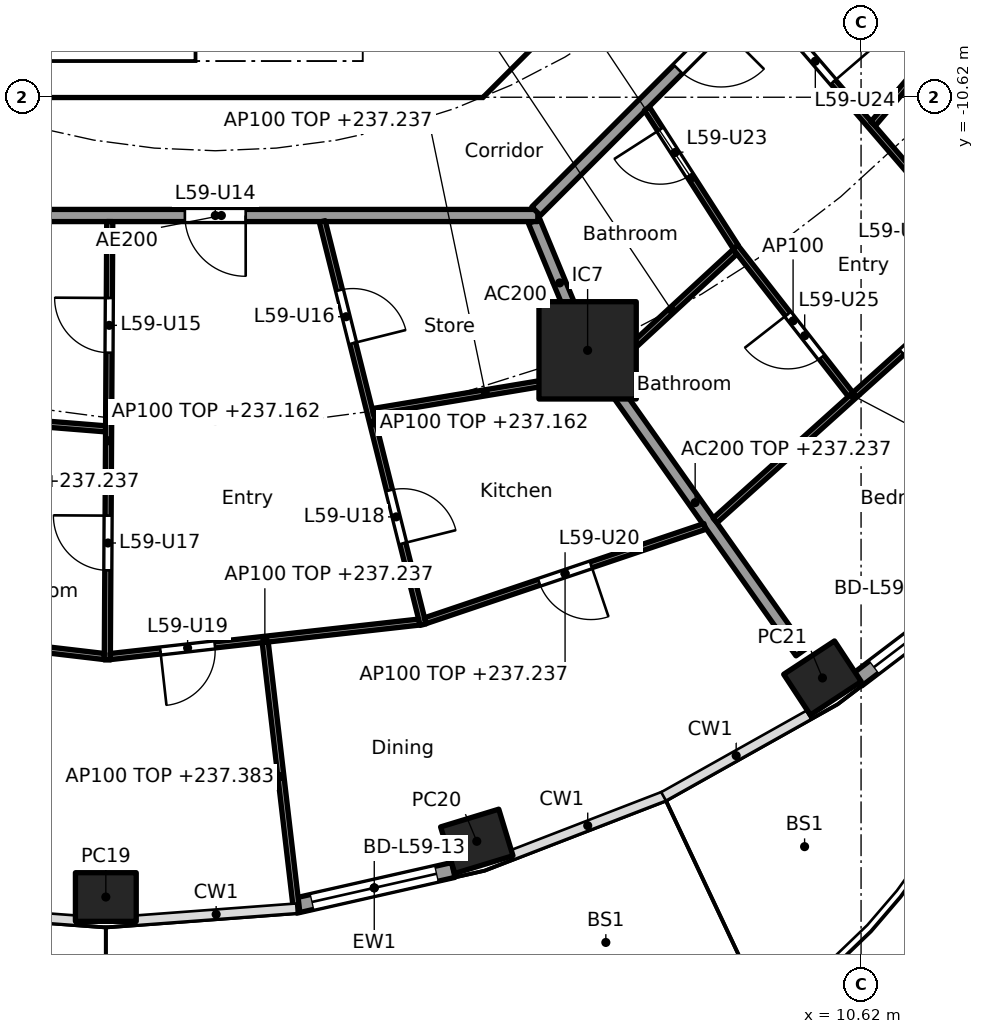
"""IFC4 building model, lengths in metres.
Left out: names, types, materials, properties, quantities, classifications, styles, units other than length and angle.
Written with IfcOpenShell. Run it as: python <this file> out.ifc"""

import sys

from ifc_helpers import new_model, si_unit, direction, frame, frame_2d, origin, origin_2d, place, context, subcontext, project, spatial, polyline, rectangle, hollow_rectangle, outline, extrude, element, fill, save


model = new_model("IFC4")
c1 = context("Model", 3, precision=1e-05, world=origin(), true_north=direction((0.0, 1.0)))
c2 = subcontext(c1, "Body", "Model", "MODEL_VIEW")
j1 = project(units=[si_unit("LENGTHUNIT", "METRE"), si_unit("PLANEANGLEUNIT", "RADIAN")], contexts=[c1])
p1 = place(None, origin())
s1 = spatial("IfcSite", under=j1, at=p1, CompositionType="ELEMENT")
p2 = place(p1, origin())
s2 = spatial("IfcBuilding", under=s1, at=p2, CompositionType="ELEMENT")
p3 = place(p2, frame((0.0, 0.0, 234.4)))
s3 = spatial("IfcBuildingStorey", under=s2, at=p3, CompositionType="ELEMENT", Elevation=234.4)
for number, where, z_axis, x_axis in (
    (1, (-1.8, -23.772, 0.0), (0.0, 0.0, 1.0), (1.0, 0.0, 0.0)),
    (2, (4.3, -22.856, 0.0), (0.0, 0.0, 1.0), (0.957, 0.292, 0.0)),
    (3, (9.985, -20.17, 0.0), (0.0, 0.0, 1.0), (0.836, 0.549, 0.0)),
):
    element("IfcColumn", number, at=place(p3, frame(where, z_axis=z_axis, x_axis=x_axis)), inside=s3, PredefinedType="COLUMN", context=c2, shape_type="SweptSolid", body=[
        extrude(hollow_rectangle(XDim=1.0, YDim=0.8, WallThickness=0.032, at=origin_2d()), origin(), (0.0, 0.0, 1.0), 3.7),
    ])
p4 = place(p3, frame((6.123, -14.782, 0.0), z_axis=(0.0, 0.0, 1.0), x_axis=(1.0, 0.0, 0.0)))
e4 = element("IfcColumn", 4, at=p4, inside=s3, PredefinedType="COLUMN", context=c2, shape_type="SweptSolid", body=[
    extrude(rectangle(XDim=1.6, YDim=1.6, at=origin_2d()), origin(), (0.0, 0.0, 1.0), 3.7),
])
p5 = place(p3, frame((3.915, -23.327, 0.0), z_axis=(0.0, 0.0, 1.0), x_axis=(-0.975324089124, -0.220777990694, 0.0)))
e5 = element("IfcWall", 5, at=p5, inside=s3, PredefinedType="SOLIDWALL", context=c2, shape_type="SweptSolid", body=[
    extrude(rectangle(XDim=2.666, YDim=0.25, at=frame_2d((1.333, 0.0))), origin(), (0.0, 0.0, 1.0), 3.44),
])
p6 = place(p5, frame((0.283, 0.0, 0.0)))
e6 = element("IfcOpeningElement", 6, at=p6, cuts=e5, PredefinedType="OPENING", context=c2, shape_type="SweptSolid", body=[
    extrude(rectangle(XDim=2.1, YDim=2.4, at=frame_2d((1.05, 1.2))), frame((0.0, 0.135, 0.0), z_axis=(0.0, -1.0, 0.0), x_axis=(1.0, 0.0, 0.0)), (0.0, 0.0, 1.0), 0.27),
])
p7 = place(p3, frame((12.777, -18.513, 0.0), z_axis=(0.0, 0.0, 1.0), x_axis=(-0.796022158395, -0.605267480825, 0.0)))
e7 = element("IfcWall", 7, at=p7, inside=s3, PredefinedType="SOLIDWALL", context=c2, shape_type="SweptSolid", body=[
    extrude(rectangle(XDim=2.789, YDim=0.25, at=frame_2d((1.395, 0.0))), origin(), (0.0, 0.0, 1.0), 3.44),
])
p8 = place(p7, frame((0.344, 0.0, 0.0)))
e8 = element("IfcOpeningElement", 8, at=p8, cuts=e7, PredefinedType="OPENING", context=c2, shape_type="SweptSolid", body=[
    extrude(rectangle(XDim=2.1, YDim=2.4, at=frame_2d((1.05, 1.2))), frame((0.0, 0.135, 0.0), z_axis=(0.0, -1.0, 0.0), x_axis=(1.0, 0.0, 0.0)), (0.0, 0.0, 1.0), 0.27),
])
p9 = place(p3, frame((4.613, -9.988, 0.0), z_axis=(0.0, 0.0, 1.0), x_axis=(0.707106781187, 0.707106781187, 0.0)))
e9 = element("IfcWall", 9, at=p9, inside=s3, PredefinedType="SHEAR", context=c2, shape_type="SweptSolid", body=[
    extrude(rectangle(XDim=7.602, YDim=0.6, at=frame_2d((3.801, 0.0))), origin(), (0.0, 0.0, 1.0), 3.44),
])
p10 = place(p9, frame((3.201, 0.0, 0.0)))
e10 = element("IfcOpeningElement", 10, at=p10, cuts=e9, PredefinedType="OPENING", context=c2, shape_type="SweptSolid", body=[
    extrude(rectangle(XDim=1.2, YDim=2.1, at=frame_2d((0.6, 1.05))), frame((0.0, 0.31, 0.0), z_axis=(0.0, -1.0, 0.0), x_axis=(1.0, 0.0, 0.0)), (0.0, 0.0, 1.0), 0.62),
])
p11 = place(p3, frame((4.0, -10.025, 0.0), z_axis=(0.0, 0.0, 1.0), x_axis=(0.0, 1.0, 0.0)))
e11 = element("IfcWall", 11, at=p11, inside=s3, PredefinedType="SOLIDWALL", context=c2, shape_type="SweptSolid", body=[
    extrude(rectangle(XDim=3.0, YDim=0.2, at=frame_2d((1.5, 0.0))), origin(), (0.0, 0.0, 1.0), 3.44),
])
p12 = place(p11, frame((0.975, 0.0, 0.0)))
e12 = element("IfcOpeningElement", 12, at=p12, cuts=e11, PredefinedType="OPENING", context=c2, shape_type="SweptSolid", body=[
    extrude(rectangle(XDim=1.1, YDim=2.1, at=frame_2d((0.55, 1.05))), frame((0.0, 0.11, 0.0), z_axis=(0.0, -1.0, 0.0), x_axis=(1.0, 0.0, 0.0)), (0.0, 0.0, 1.0), 0.22),
])
p13 = place(p3, origin())
e13 = element("IfcWall", 13, at=p13, inside=s3, PredefinedType="SHEAR", context=c2, shape_type="SweptSolid", body=[
    extrude(outline(polyline([(-4.152, -10.025), (4.152, -10.025), (4.401, -9.776), (4.825, -10.2), (4.401, -10.625), (-4.401, -10.625), (-4.825, -10.2), (-4.401, -9.776), (-4.152, -10.025)])), origin(), (0.0, 0.0, 1.0), 3.44),
])
p14 = place(p3, frame((5.243, -12.657, 0.0), z_axis=(0.0, 0.0, 1.0), x_axis=(0.382691608661, -0.923876145736, 0.0)))
e14 = element("IfcWall", 14, at=p14, inside=s3, PredefinedType="PARTITIONING", context=c2, shape_type="SweptSolid", body=[
    extrude(rectangle(XDim=2.2, YDim=0.2, at=frame_2d((1.1, 0.0))), origin(), (0.0, 0.0, 1.0), 3.44),
])
p15 = place(p3, frame((6.152, -14.823, 0.0), z_axis=(0.0, 0.0, 1.0), x_axis=(0.576994695158, -0.816747893637, 0.0)))
e15 = element("IfcWall", 15, at=p15, inside=s3, PredefinedType="PARTITIONING", context=c2, shape_type="SweptSolid", body=[
    extrude(rectangle(XDim=6.03, YDim=0.2, at=frame_2d((3.015, 0.0))), origin(), (0.0, 0.0, 1.0), 2.837),
])
p16 = place(p3, frame((-5.104, -12.565, 0.0), z_axis=(0.0, 0.0, 1.0), x_axis=(1.0, 0.0, 0.0)))
e16 = element("IfcWall", 16, at=p16, inside=s3, PredefinedType="PARTITIONING", context=c2, shape_type="SweptSolid", body=[
    extrude(rectangle(XDim=10.409, YDim=0.2, at=frame_2d((5.205, 0.0))), origin(), (0.0, 0.0, 1.0), 3.44),
])
p17 = place(p16, frame((4.604, 0.0, 0.0)))
e17 = element("IfcOpeningElement", 17, at=p17, cuts=e16, PredefinedType="OPENING", context=c2, shape_type="SweptSolid", body=[
    extrude(rectangle(XDim=1.0, YDim=2.1, at=frame_2d((0.5, 1.05))), frame((0.0, 0.11, 0.0), z_axis=(0.0, -1.0, 0.0), x_axis=(1.0, 0.0, 0.0)), (0.0, 0.0, 1.0), 0.22),
])
p18 = place(p3, frame((5.275, -12.494, 0.0), z_axis=(0.0, 0.0, 1.0), x_axis=(0.707106781187, 0.707106781187, 0.0)))
e18 = element("IfcWall", 18, at=p18, inside=s3, PredefinedType="PARTITIONING", context=c2, shape_type="SweptSolid", body=[
    extrude(rectangle(XDim=10.409, YDim=0.2, at=frame_2d((5.205, 0.0))), origin(), (0.0, 0.0, 1.0), 3.44),
])
p19 = place(p18, frame((3.303, 0.0, 0.0)))
e19 = element("IfcOpeningElement", 19, at=p19, cuts=e18, PredefinedType="OPENING", context=c2, shape_type="SweptSolid", body=[
    extrude(rectangle(XDim=1.0, YDim=2.1, at=frame_2d((0.5, 1.05))), frame((0.0, 0.11, 0.0), z_axis=(0.0, -1.0, 0.0), x_axis=(1.0, 0.0, 0.0)), (0.0, 0.0, 1.0), 0.22),
])
p20 = place(p3, frame((-6.23, -15.717, 0.0), z_axis=(0.0, 0.0, 1.0), x_axis=(0.996785662802, -0.080114558181, 0.0)))
e20 = element("IfcWall", 20, at=p20, inside=s3, PredefinedType="PARTITIONING", context=c2, shape_type="SweptSolid", body=[
    extrude(rectangle(XDim=4.44, YDim=0.1, at=frame_2d((2.22, 0.0))), origin(), (0.0, 0.0, 1.0), 2.837),
])
p21 = place(p3, frame((-7.008, -19.209, 0.0), z_axis=(0.0, 0.0, 1.0), x_axis=(0.993174535364, -0.116637653885, 0.0)))
e21 = element("IfcWall", 21, at=p21, inside=s3, PredefinedType="PARTITIONING", context=c2, shape_type="SweptSolid", body=[
    extrude(rectangle(XDim=5.218, YDim=0.1, at=frame_2d((2.609, 0.0))), origin(), (0.0, 0.0, 1.0), 2.837),
])
p22 = place(p21, frame((0.842, 0.0, 0.0)))
e22 = element("IfcOpeningElement", 22, at=p22, cuts=e21, PredefinedType="OPENING", context=c2, shape_type="SweptSolid", body=[
    extrude(rectangle(XDim=0.9, YDim=2.1, at=frame_2d((0.45, 1.05))), frame((0.0, 0.06, 0.0), z_axis=(0.0, -1.0, 0.0), x_axis=(1.0, 0.0, 0.0)), (0.0, 0.0, 1.0), 0.12),
])
p23 = place(p3, frame((-1.735, -12.665, 0.0), z_axis=(0.0, 0.0, 1.0), x_axis=(-0.005554152823, -0.999984575574, 0.0)))
e23 = element("IfcWall", 23, at=p23, inside=s3, PredefinedType="PARTITIONING", context=c2, shape_type="SweptSolid", body=[
    extrude(rectangle(XDim=7.209, YDim=0.1, at=frame_2d((3.604, 0.0))), origin(), (0.0, 0.0, 1.0), 2.762),
])
p24 = place(p23, frame((1.256, 0.0, 0.0)))
e24 = element("IfcOpeningElement", 24, at=p24, cuts=e23, PredefinedType="OPENING", context=c2, shape_type="SweptSolid", body=[
    extrude(rectangle(XDim=0.9, YDim=2.1, at=frame_2d((0.45, 1.05))), frame((0.0, 0.06, 0.0), z_axis=(0.0, -1.0, 0.0), x_axis=(1.0, 0.0, 0.0)), (0.0, 0.0, 1.0), 0.12),
])
p25 = place(p23, frame((4.836, 0.0, 0.0)))
e25 = element("IfcOpeningElement", 25, at=p25, cuts=e23, PredefinedType="OPENING", context=c2, shape_type="SweptSolid", body=[
    extrude(rectangle(XDim=0.9, YDim=2.1, at=frame_2d((0.45, 1.05))), frame((0.0, 0.06, 0.0), z_axis=(0.0, -1.0, 0.0), x_axis=(1.0, 0.0, 0.0)), (0.0, 0.0, 1.0), 0.12),
])
p26 = place(p3, frame((-1.726, -19.818, 0.0), z_axis=(0.0, 0.0, 1.0), x_axis=(0.99381893047, 0.111013212902, 0.0)))
e26 = element("IfcWall", 26, at=p26, inside=s3, PredefinedType="PARTITIONING", context=c2, shape_type="SweptSolid", body=[
    extrude(rectangle(XDim=5.113, YDim=0.1, at=frame_2d((2.557, 0.0))), origin(), (0.0, 0.0, 1.0), 2.837),
])
p27 = place(p26, frame((0.828, 0.0, 0.0)))
e27 = element("IfcOpeningElement", 27, at=p27, cuts=e26, PredefinedType="OPENING", context=c2, shape_type="SweptSolid", body=[
    extrude(rectangle(XDim=0.9, YDim=2.1, at=frame_2d((0.45, 1.05))), frame((0.0, 0.06, 0.0), z_axis=(0.0, -1.0, 0.0), x_axis=(1.0, 0.0, 0.0)), (0.0, 0.0, 1.0), 0.12),
])
p28 = place(p3, frame((0.821, -19.584, 0.0), z_axis=(0.0, 0.0, 1.0), x_axis=(0.116120946841, -0.993235080786, 0.0)))
e28 = element("IfcWall", 28, at=p28, inside=s3, PredefinedType="PARTITIONING", context=c2, shape_type="SweptSolid", body=[
    extrude(rectangle(XDim=4.445, YDim=0.1, at=frame_2d((2.222, 0.0))), origin(), (0.0, 0.0, 1.0), 2.983),
])
p29 = place(p3, frame((1.759, -12.662, 0.0), z_axis=(0.0, 0.0, 1.0), x_axis=(0.242653275363, -0.970113079984, 0.0)))
e29 = element("IfcWall", 29, at=p29, inside=s3, PredefinedType="PARTITIONING", context=c2, shape_type="SweptSolid", body=[
    extrude(rectangle(XDim=6.836, YDim=0.1, at=frame_2d((3.418, 0.0))), origin(), (0.0, 0.0, 1.0), 2.762),
])
p30 = place(p29, frame((1.166, 0.0, 0.0)))
e30 = element("IfcOpeningElement", 30, at=p30, cuts=e29, PredefinedType="OPENING", context=c2, shape_type="SweptSolid", body=[
    extrude(rectangle(XDim=0.9, YDim=2.1, at=frame_2d((0.45, 1.05))), frame((0.0, 0.06, 0.0), z_axis=(0.0, -1.0, 0.0), x_axis=(1.0, 0.0, 0.0)), (0.0, 0.0, 1.0), 0.12),
])
p31 = place(p29, frame((4.559, 0.0, 0.0)))
e31 = element("IfcOpeningElement", 31, at=p31, cuts=e29, PredefinedType="OPENING", context=c2, shape_type="SweptSolid", body=[
    extrude(rectangle(XDim=0.9, YDim=2.1, at=frame_2d((0.45, 1.05))), frame((0.0, 0.06, 0.0), z_axis=(0.0, -1.0, 0.0), x_axis=(1.0, 0.0, 0.0)), (0.0, 0.0, 1.0), 0.12),
])
p32 = place(p3, frame((2.593, -15.789, 0.0), z_axis=(0.0, 0.0, 1.0), x_axis=(0.986385117656, 0.164451815639, 0.0)))
e32 = element("IfcWall", 32, at=p32, inside=s3, PredefinedType="PARTITIONING", context=c2, shape_type="SweptSolid", body=[
    extrude(rectangle(XDim=3.747, YDim=0.1, at=frame_2d((1.874, 0.0))), origin(), (0.0, 0.0, 1.0), 2.837),
])
p33 = place(p3, frame((3.453, -19.229, 0.0), z_axis=(0.0, 0.0, 1.0), x_axis=(0.947565610716, 0.31956128268, 0.0)))
e33 = element("IfcWall", 33, at=p33, inside=s3, PredefinedType="PARTITIONING", context=c2, shape_type="SweptSolid", body=[
    extrude(rectangle(XDim=4.853, YDim=0.1, at=frame_2d((2.426, 0.0))), origin(), (0.0, 0.0, 1.0), 2.837),
])
p34 = place(p33, frame((1.976, 0.0, 0.0)))
e34 = element("IfcOpeningElement", 34, at=p34, cuts=e33, PredefinedType="OPENING", context=c2, shape_type="SweptSolid", body=[
    extrude(rectangle(XDim=0.9, YDim=2.1, at=frame_2d((0.45, 1.05))), frame((0.0, 0.06, 0.0), z_axis=(0.0, -1.0, 0.0), x_axis=(1.0, 0.0, 0.0)), (0.0, 0.0, 1.0), 0.12),
])
p35 = place(p3, frame((6.461, -15.088, 0.0), z_axis=(0.0, 0.0, 1.0), x_axis=(0.734625662691, 0.678472649203, 0.0)))
e35 = element("IfcWall", 35, at=p35, inside=s3, PredefinedType="PARTITIONING", context=c2, shape_type="SweptSolid", body=[
    extrude(rectangle(XDim=2.844, YDim=0.1, at=frame_2d((1.422, 0.0))), origin(), (0.0, 0.0, 1.0), 2.837),
])
p36 = place(p3, frame((8.22, -17.579, 0.0), z_axis=(0.0, 0.0, 1.0), x_axis=(0.743696370895, 0.668517544958, 0.0)))
e36 = element("IfcWall", 36, at=p36, inside=s3, PredefinedType="PARTITIONING", context=c2, shape_type="SweptSolid", body=[
    extrude(rectangle(XDim=6.125, YDim=0.1, at=frame_2d((3.062, 0.0))), origin(), (0.0, 0.0, 1.0), 2.837),
])
p37 = place(p36, frame((4.131, 0.0, 0.0)))
e37 = element("IfcOpeningElement", 37, at=p37, cuts=e36, PredefinedType="OPENING", context=c2, shape_type="SweptSolid", body=[
    extrude(rectangle(XDim=0.9, YDim=2.1, at=frame_2d((0.45, 1.05))), frame((0.0, 0.06, 0.0), z_axis=(0.0, -1.0, 0.0), x_axis=(1.0, 0.0, 0.0)), (0.0, 0.0, 1.0), 0.12),
])
p38 = place(p3, frame((7.099, -10.809, 0.0), z_axis=(0.0, 0.0, 1.0), x_axis=(0.540424285965, -0.841392649801, 0.0)))
e38 = element("IfcWall", 38, at=p38, inside=s3, PredefinedType="PARTITIONING", context=c2, shape_type="SweptSolid", body=[
    extrude(rectangle(XDim=2.703, YDim=0.1, at=frame_2d((1.352, 0.0))), origin(), (0.0, 0.0, 1.0), 2.762),
])
p39 = place(p38, frame((0.405, 0.0, 0.0)))
e39 = element("IfcOpeningElement", 39, at=p39, cuts=e38, PredefinedType="OPENING", context=c2, shape_type="SweptSolid", body=[
    extrude(rectangle(XDim=0.9, YDim=2.1, at=frame_2d((0.45, 1.05))), frame((0.0, 0.06, 0.0), z_axis=(0.0, -1.0, 0.0), x_axis=(1.0, 0.0, 0.0)), (0.0, 0.0, 1.0), 0.12),
])
p40 = place(p3, frame((8.555, -13.086, 0.0), z_axis=(0.0, 0.0, 1.0), x_axis=(0.61562093425, -0.788042426087, 0.0)))
e40 = element("IfcWall", 40, at=p40, inside=s3, PredefinedType="PARTITIONING", context=c2, shape_type="SweptSolid", body=[
    extrude(rectangle(XDim=3.075, YDim=0.1, at=frame_2d((1.538, 0.0))), origin(), (0.0, 0.0, 1.0), 3.44),
])
p41 = place(p40, frame((1.398, 0.0, 0.0)))
e41 = element("IfcOpeningElement", 41, at=p41, cuts=e40, PredefinedType="OPENING", context=c2, shape_type="SweptSolid", body=[
    extrude(rectangle(XDim=0.9, YDim=2.1, at=frame_2d((0.45, 1.05))), frame((0.0, 0.06, 0.0), z_axis=(0.0, -1.0, 0.0), x_axis=(1.0, 0.0, 0.0)), (0.0, 0.0, 1.0), 0.12),
])
p42 = place(p3, frame((8.95, -8.96, 0.0), z_axis=(0.0, 0.0, 1.0), x_axis=(0.652102165991, -0.758131100213, 0.0)))
e42 = element("IfcWall", 42, at=p42, inside=s3, PredefinedType="PARTITIONING", context=c2, shape_type="SweptSolid", body=[
    extrude(rectangle(XDim=8.568, YDim=0.1, at=frame_2d((4.284, 0.0))), origin(), (0.0, 0.0, 1.0), 2.762),
])
p43 = place(p42, frame((0.957, 0.0, 0.0)))
e43 = element("IfcOpeningElement", 43, at=p43, cuts=e42, PredefinedType="OPENING", context=c2, shape_type="SweptSolid", body=[
    extrude(rectangle(XDim=0.9, YDim=2.1, at=frame_2d((0.45, 1.05))), frame((0.0, 0.06, 0.0), z_axis=(0.0, -1.0, 0.0), x_axis=(1.0, 0.0, 0.0)), (0.0, 0.0, 1.0), 0.12),
])
p44 = place(p42, frame((3.919, 0.0, 0.0)))
e44 = element("IfcOpeningElement", 44, at=p44, cuts=e42, PredefinedType="OPENING", context=c2, shape_type="SweptSolid", body=[
    extrude(rectangle(XDim=0.9, YDim=2.1, at=frame_2d((0.45, 1.05))), frame((0.0, 0.06, 0.0), z_axis=(0.0, -1.0, 0.0), x_axis=(1.0, 0.0, 0.0)), (0.0, 0.0, 1.0), 0.12),
])
p45 = place(p3, frame((10.818, -11.056, 0.0), z_axis=(0.0, 0.0, 1.0), x_axis=(0.646981604878, 0.762505608471, 0.0)))
e45 = element("IfcWall", 45, at=p45, inside=s3, PredefinedType="PARTITIONING", context=c2, shape_type="SweptSolid", body=[
    extrude(rectangle(XDim=6.209, YDim=0.1, at=frame_2d((3.104, 0.0))), origin(), (0.0, 0.0, 1.0), 2.837),
])
p46 = place(p6, origin())
e46 = element("IfcDoor", 46, at=p46, inside=s3, OperationType="SLIDING_TO_LEFT", PredefinedType="DOOR", context=c2, shape_type="SweptSolid", body=[
    extrude(rectangle(XDim=2.1, YDim=2.4, at=frame_2d((1.05, 1.2))), frame((0.0, 0.025, 0.0), z_axis=(0.0, -1.0, 0.0), x_axis=(1.0, 0.0, 0.0)), (0.0, 0.0, 1.0), 0.05),
])
fill(e6, e46)
p47 = place(p8, origin())
e47 = element("IfcDoor", 47, at=p47, inside=s3, OperationType="SLIDING_TO_LEFT", PredefinedType="DOOR", context=c2, shape_type="SweptSolid", body=[
    extrude(rectangle(XDim=2.1, YDim=2.4, at=frame_2d((1.05, 1.2))), frame((0.0, 0.025, 0.0), z_axis=(0.0, -1.0, 0.0), x_axis=(1.0, 0.0, 0.0)), (0.0, 0.0, 1.0), 0.05),
])
fill(e8, e47)
p48 = place(p17, frame((1.0, 0.0, 0.0), x_axis=(-1.0, 0.0, 0.0)))
e48 = element("IfcDoor", 48, at=p48, inside=s3, OperationType="SINGLE_SWING_LEFT", PredefinedType="DOOR", context=c2, shape_type="SweptSolid", body=[
    extrude(rectangle(XDim=1.0, YDim=2.1, at=frame_2d((0.5, 1.05))), frame((0.0, 0.025, 0.0), z_axis=(0.0, -1.0, 0.0), x_axis=(1.0, 0.0, 0.0)), (0.0, 0.0, 1.0), 0.05),
])
fill(e17, e48)
p49 = place(p24, frame((0.9, 0.0, 0.0), x_axis=(-1.0, 0.0, 0.0)))
e49 = element("IfcDoor", 49, at=p49, inside=s3, OperationType="SINGLE_SWING_RIGHT", PredefinedType="DOOR", context=c2, shape_type="SweptSolid", body=[
    extrude(rectangle(XDim=0.9, YDim=2.1, at=frame_2d((0.45, 1.05))), frame((0.0, 0.025, 0.0), z_axis=(0.0, -1.0, 0.0), x_axis=(1.0, 0.0, 0.0)), (0.0, 0.0, 1.0), 0.05),
])
fill(e24, e49)
p50 = place(p30, origin())
e50 = element("IfcDoor", 50, at=p50, inside=s3, OperationType="SINGLE_SWING_RIGHT", PredefinedType="DOOR", context=c2, shape_type="SweptSolid", body=[
    extrude(rectangle(XDim=0.9, YDim=2.1, at=frame_2d((0.45, 1.05))), frame((0.0, 0.025, 0.0), z_axis=(0.0, -1.0, 0.0), x_axis=(1.0, 0.0, 0.0)), (0.0, 0.0, 1.0), 0.05),
])
fill(e30, e50)
p51 = place(p25, frame((0.9, 0.0, 0.0), x_axis=(-1.0, 0.0, 0.0)))
e51 = element("IfcDoor", 51, at=p51, inside=s3, OperationType="SINGLE_SWING_RIGHT", PredefinedType="DOOR", context=c2, shape_type="SweptSolid", body=[
    extrude(rectangle(XDim=0.9, YDim=2.1, at=frame_2d((0.45, 1.05))), frame((0.0, 0.025, 0.0), z_axis=(0.0, -1.0, 0.0), x_axis=(1.0, 0.0, 0.0)), (0.0, 0.0, 1.0), 0.05),
])
fill(e25, e51)
p52 = place(p31, origin())
e52 = element("IfcDoor", 52, at=p52, inside=s3, OperationType="SINGLE_SWING_RIGHT", PredefinedType="DOOR", context=c2, shape_type="SweptSolid", body=[
    extrude(rectangle(XDim=0.9, YDim=2.1, at=frame_2d((0.45, 1.05))), frame((0.0, 0.025, 0.0), z_axis=(0.0, -1.0, 0.0), x_axis=(1.0, 0.0, 0.0)), (0.0, 0.0, 1.0), 0.05),
])
fill(e31, e52)
p53 = place(p27, frame((0.9, 0.0, 0.0), x_axis=(-1.0, 0.0, 0.0)))
e53 = element("IfcDoor", 53, at=p53, inside=s3, OperationType="SINGLE_SWING_RIGHT", PredefinedType="DOOR", context=c2, shape_type="SweptSolid", body=[
    extrude(rectangle(XDim=0.9, YDim=2.1, at=frame_2d((0.45, 1.05))), frame((0.0, 0.025, 0.0), z_axis=(0.0, -1.0, 0.0), x_axis=(1.0, 0.0, 0.0)), (0.0, 0.0, 1.0), 0.05),
])
fill(e27, e53)
p54 = place(p34, frame((0.9, 0.0, 0.0), x_axis=(-1.0, 0.0, 0.0)))
e54 = element("IfcDoor", 54, at=p54, inside=s3, OperationType="SINGLE_SWING_LEFT", PredefinedType="DOOR", context=c2, shape_type="SweptSolid", body=[
    extrude(rectangle(XDim=0.9, YDim=2.1, at=frame_2d((0.45, 1.05))), frame((0.0, 0.025, 0.0), z_axis=(0.0, -1.0, 0.0), x_axis=(1.0, 0.0, 0.0)), (0.0, 0.0, 1.0), 0.05),
])
fill(e34, e54)
p55 = place(p19, frame((1.0, 0.0, 0.0), x_axis=(-1.0, 0.0, 0.0)))
e55 = element("IfcDoor", 55, at=p55, inside=s3, OperationType="SINGLE_SWING_LEFT", PredefinedType="DOOR", context=c2, shape_type="SweptSolid", body=[
    extrude(rectangle(XDim=1.0, YDim=2.1, at=frame_2d((0.5, 1.05))), frame((0.0, 0.025, 0.0), z_axis=(0.0, -1.0, 0.0), x_axis=(1.0, 0.0, 0.0)), (0.0, 0.0, 1.0), 0.05),
])
fill(e19, e55)
p56 = place(p39, frame((0.9, 0.0, 0.0), x_axis=(-1.0, 0.0, 0.0)))
e56 = element("IfcDoor", 56, at=p56, inside=s3, OperationType="SINGLE_SWING_RIGHT", PredefinedType="DOOR", context=c2, shape_type="SweptSolid", body=[
    extrude(rectangle(XDim=0.9, YDim=2.1, at=frame_2d((0.45, 1.05))), frame((0.0, 0.025, 0.0), z_axis=(0.0, -1.0, 0.0), x_axis=(1.0, 0.0, 0.0)), (0.0, 0.0, 1.0), 0.05),
])
fill(e39, e56)
p57 = place(p43, origin())
e57 = element("IfcDoor", 57, at=p57, inside=s3, OperationType="SINGLE_SWING_RIGHT", PredefinedType="DOOR", context=c2, shape_type="SweptSolid", body=[
    extrude(rectangle(XDim=0.9, YDim=2.1, at=frame_2d((0.45, 1.05))), frame((0.0, 0.025, 0.0), z_axis=(0.0, -1.0, 0.0), x_axis=(1.0, 0.0, 0.0)), (0.0, 0.0, 1.0), 0.05),
])
fill(e43, e57)
p58 = place(p41, frame((0.9, 0.0, 0.0), x_axis=(-1.0, 0.0, 0.0)))
e58 = element("IfcDoor", 58, at=p58, inside=s3, OperationType="SINGLE_SWING_RIGHT", PredefinedType="DOOR", context=c2, shape_type="SweptSolid", body=[
    extrude(rectangle(XDim=0.9, YDim=2.1, at=frame_2d((0.45, 1.05))), frame((0.0, 0.025, 0.0), z_axis=(0.0, -1.0, 0.0), x_axis=(1.0, 0.0, 0.0)), (0.0, 0.0, 1.0), 0.05),
])
fill(e41, e58)
p59 = place(p37, frame((0.9, 0.0, 0.0), x_axis=(-1.0, 0.0, 0.0)))
e59 = element("IfcDoor", 59, at=p59, inside=s3, OperationType="SINGLE_SWING_RIGHT", PredefinedType="DOOR", context=c2, shape_type="SweptSolid", body=[
    extrude(rectangle(XDim=0.9, YDim=2.1, at=frame_2d((0.45, 1.05))), frame((0.0, 0.025, 0.0), z_axis=(0.0, -1.0, 0.0), x_axis=(1.0, 0.0, 0.0)), (0.0, 0.0, 1.0), 0.05),
])
fill(e37, e59)
save(model, sys.argv[1])
